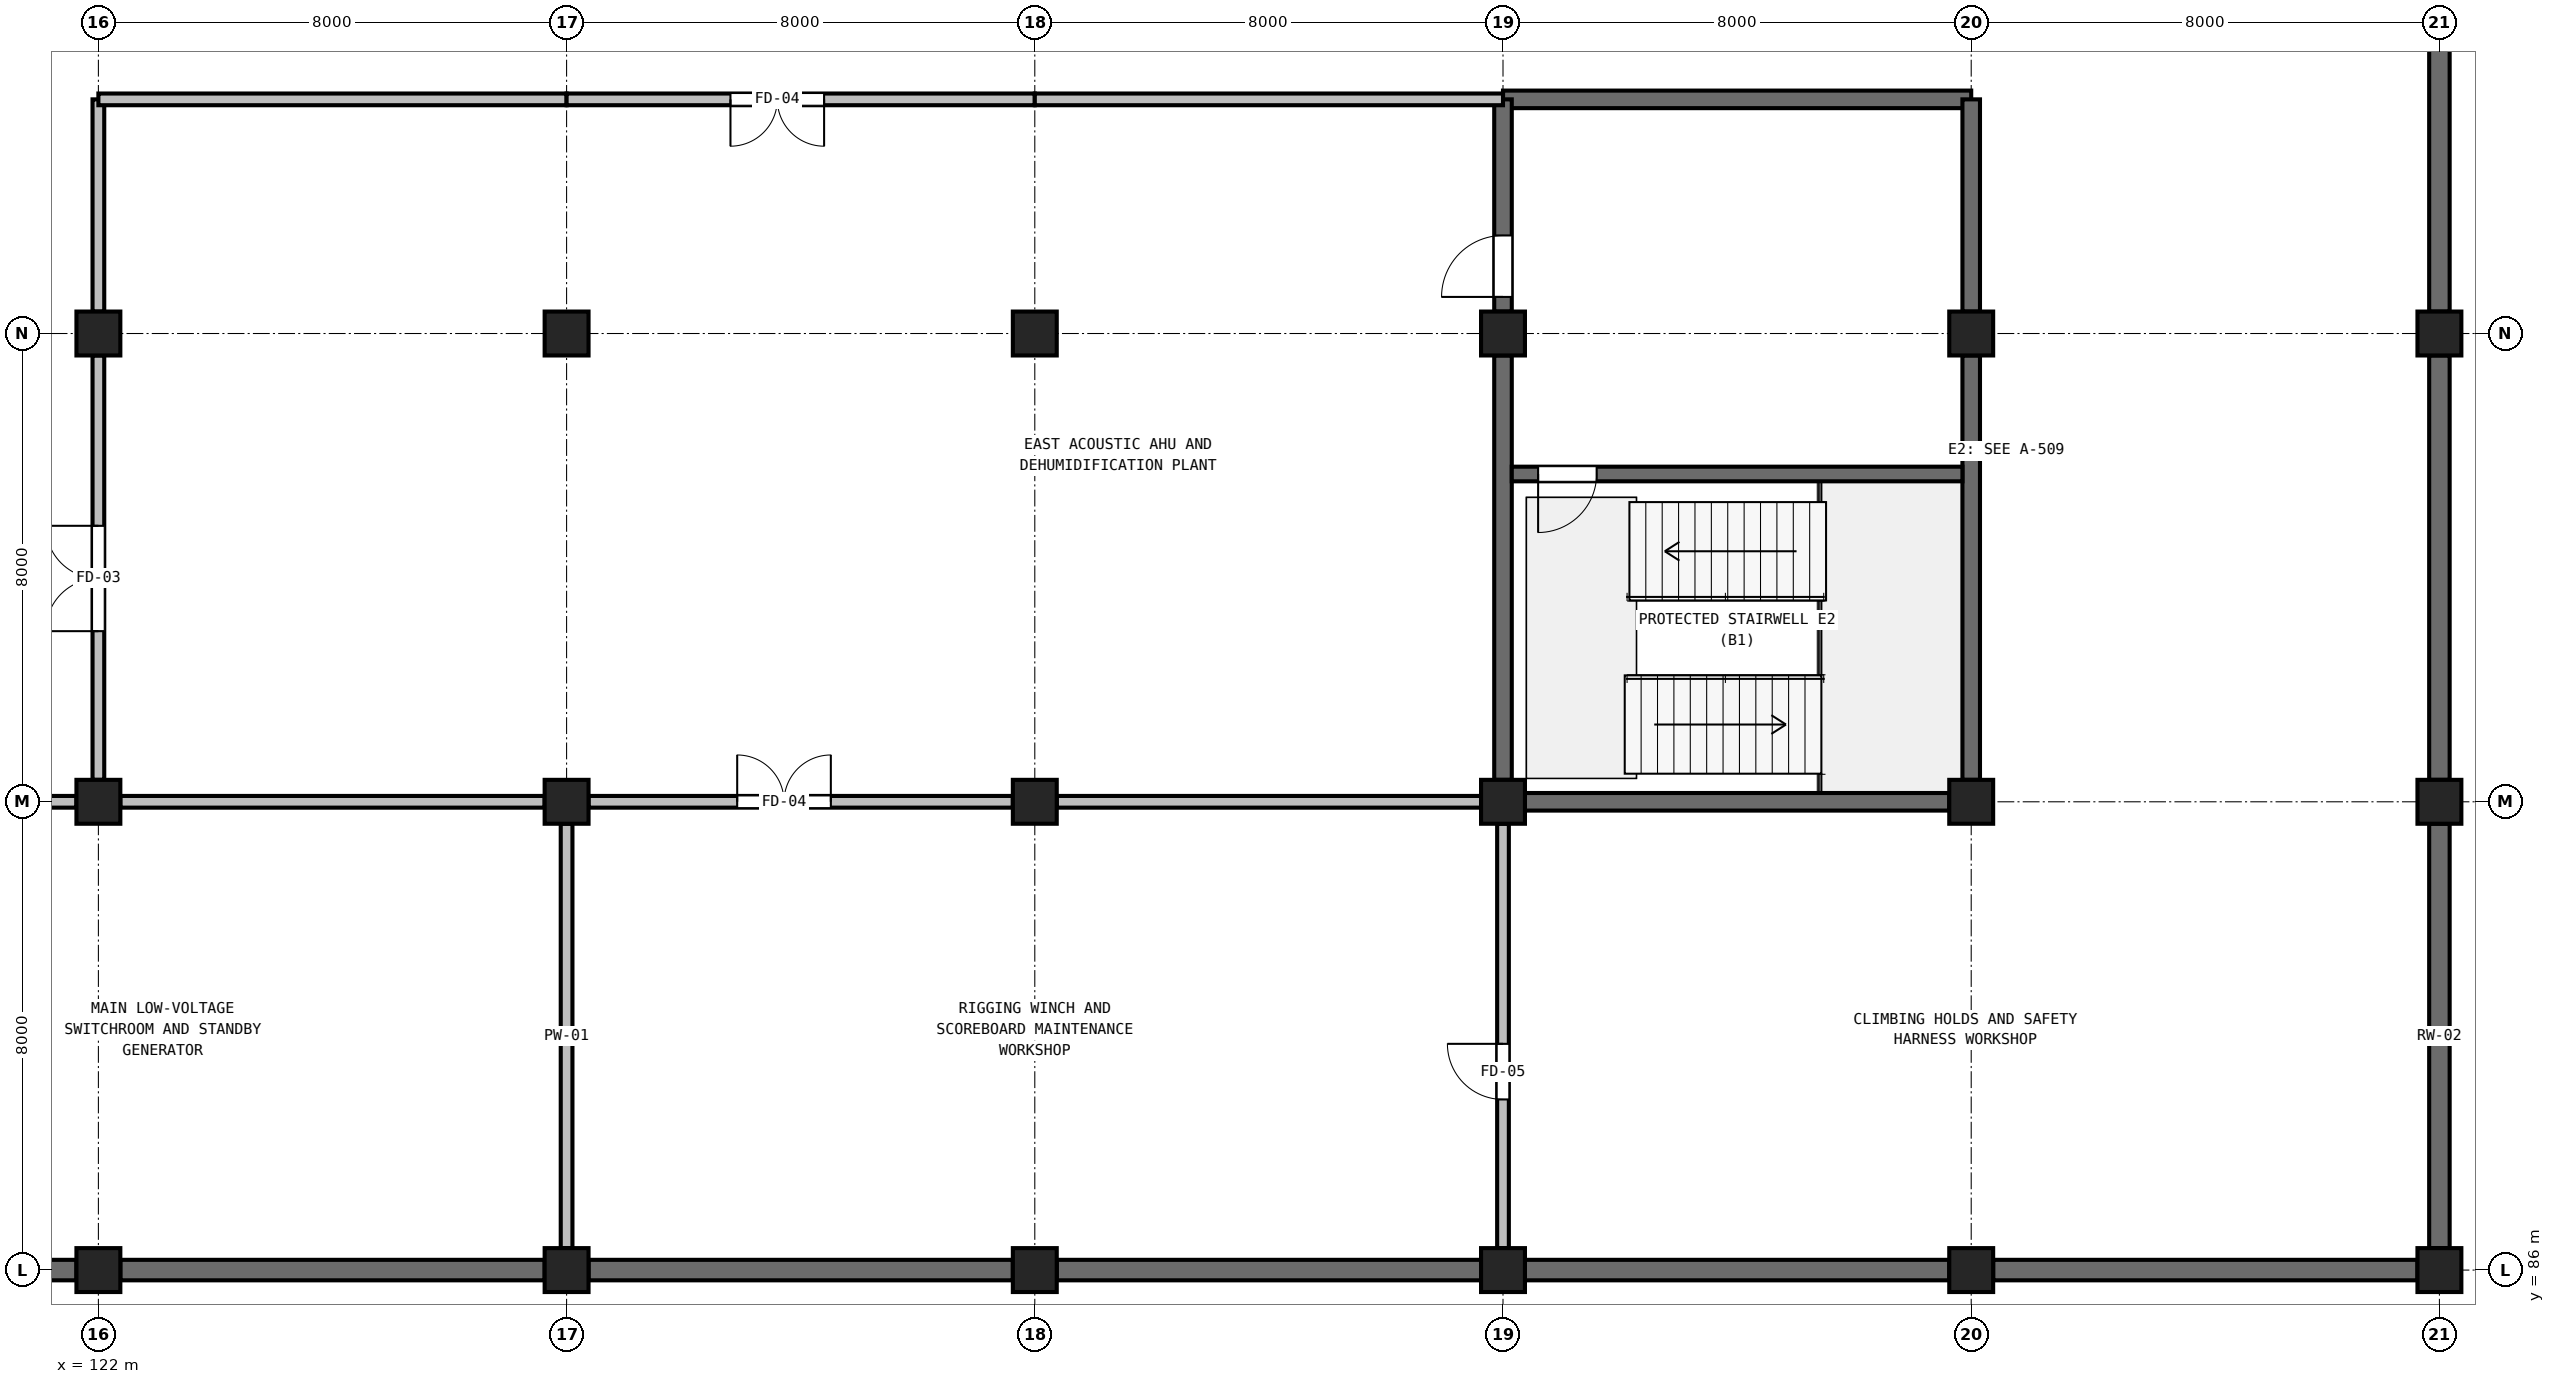
"""IFC4 building model, lengths in metres.
Left out: names, types, materials, properties, quantities, classifications, styles, units other than length and angle.
Written with IfcOpenShell. Run it as: python <this file> out.ifc"""

import sys

from ifc_helpers import new_model, si_unit, direction, frame, frame_2d, origin, origin_2d, place, context, subcontext, project, spatial, rectangle, extrude, element, fill, save


model = new_model("IFC4")
c1 = context("Model", 3, precision=1e-05, world=origin(), true_north=direction((0.0, 1.0)))
c2 = subcontext(c1, "Body", "Model", "MODEL_VIEW")
j1 = project(units=[si_unit("LENGTHUNIT", "METRE"), si_unit("PLANEANGLEUNIT", "RADIAN")], contexts=[c1])
p1 = place(None, origin())
s1 = spatial("IfcSite", under=j1, at=p1, CompositionType="ELEMENT")
p2 = place(p1, origin())
s2 = spatial("IfcBuilding", under=s1, at=p2, CompositionType="ELEMENT")
p3 = place(p2, frame((0.0, 0.0, -4.2)))
s3 = spatial("IfcBuildingStorey", under=s2, at=p3, CompositionType="ELEMENT", Elevation=-4.2)
for number, where, z_axis, x_axis in (
    (1, (122.0, 86.0, 0.0), (0.0, 0.0, 1.0), (1.0, 0.0, 0.0)),
    (2, (122.0, 94.0, 0.0), (0.0, 0.0, 1.0), (1.0, 0.0, 0.0)),
    (3, (122.0, 102.0, 0.0), (0.0, 0.0, 1.0), (1.0, 0.0, 0.0)),
    (4, (130.0, 86.0, 0.0), (0.0, 0.0, 1.0), (1.0, 0.0, 0.0)),
    (5, (130.0, 94.0, 0.0), (0.0, 0.0, 1.0), (1.0, 0.0, 0.0)),
    (6, (130.0, 102.0, 0.0), (0.0, 0.0, 1.0), (1.0, 0.0, 0.0)),
    (7, (138.0, 86.0, 0.0), (0.0, 0.0, 1.0), (1.0, 0.0, 0.0)),
    (8, (138.0, 94.0, 0.0), (0.0, 0.0, 1.0), (1.0, 0.0, 0.0)),
    (9, (138.0, 102.0, 0.0), (0.0, 0.0, 1.0), (1.0, 0.0, 0.0)),
    (10, (146.0, 86.0, 0.0), (0.0, 0.0, 1.0), (1.0, 0.0, 0.0)),
    (11, (146.0, 94.0, 0.0), (0.0, 0.0, 1.0), (1.0, 0.0, 0.0)),
    (12, (146.0, 102.0, 0.0), (0.0, 0.0, 1.0), (1.0, 0.0, 0.0)),
    (13, (154.0, 86.0, 0.0), (0.0, 0.0, 1.0), (1.0, 0.0, 0.0)),
    (14, (154.0, 94.0, 0.0), (0.0, 0.0, 1.0), (1.0, 0.0, 0.0)),
    (15, (154.0, 102.0, 0.0), (0.0, 0.0, 1.0), (1.0, 0.0, 0.0)),
    (16, (162.0, 86.0, 0.0), (0.0, 0.0, 1.0), (1.0, 0.0, 0.0)),
    (17, (162.0, 94.0, 0.0), (0.0, 0.0, 1.0), (1.0, 0.0, 0.0)),
    (18, (162.0, 102.0, 0.0), (0.0, 0.0, 1.0), (1.0, 0.0, 0.0)),
):
    element("IfcColumn", number, at=place(p3, frame(where, z_axis=z_axis, x_axis=x_axis)), inside=s3, PredefinedType="COLUMN", context=c2, shape_type="SweptSolid", body=[
        extrude(rectangle(XDim=0.75, YDim=0.75, at=origin_2d()), origin(), (0.0, 0.0, 1.0), 4.2),
    ])
for number, where, z_axis, x_axis in (
    (19, (114.375, 86.0, 0.0), (0.0, 0.0, 1.0), (1.0, 0.0, 0.0)),
    (20, (122.375, 86.0, 0.0), (0.0, 0.0, 1.0), (1.0, 0.0, 0.0)),
    (21, (130.375, 86.0, 0.0), (0.0, 0.0, 1.0), (1.0, 0.0, 0.0)),
    (22, (138.375, 86.0, 0.0), (0.0, 0.0, 1.0), (1.0, 0.0, 0.0)),
    (23, (146.375, 86.0, 0.0), (0.0, 0.0, 1.0), (1.0, 0.0, 0.0)),
    (24, (154.375, 86.0, 0.0), (0.0, 0.0, 1.0), (1.0, 0.0, 0.0)),
    (25, (162.0, 86.375, 0.0), (0.0, 0.0, 1.0), (0.0, 1.0, 0.0)),
    (26, (162.0, 94.375, 0.0), (0.0, 0.0, 1.0), (0.0, 1.0, 0.0)),
    (27, (162.0, 102.375, 0.0), (0.0, 0.0, 1.0), (0.0, 1.0, 0.0)),
):
    element("IfcWall", number, at=place(p3, frame(where, z_axis=z_axis, x_axis=x_axis)), inside=s3, PredefinedType="USERDEFINED", context=c2, shape_type="SweptSolid", body=[
        extrude(rectangle(XDim=7.25, YDim=0.35, at=frame_2d((3.625, 0.0))), origin(), (0.0, 0.0, 1.0), 3.92),
    ])
p4 = place(p3, frame((146.375, 94.0, 0.0), z_axis=(0.0, 0.0, 1.0), x_axis=(1.0, 0.0, 0.0)))
e28 = element("IfcWall", 28, at=p4, inside=s3, PredefinedType="SHEAR", context=c2, shape_type="SweptSolid", body=[
    extrude(rectangle(XDim=7.25, YDim=0.3, at=frame_2d((3.625, 0.0))), origin(), (0.0, 0.0, 1.0), 3.98),
])
p5 = place(p3, frame((146.0, 106.0, 0.0), z_axis=(0.0, 0.0, 1.0), x_axis=(1.0, 0.0, 0.0)))
e29 = element("IfcWall", 29, at=p5, inside=s3, PredefinedType="SHEAR", context=c2, shape_type="SweptSolid", body=[
    extrude(rectangle(XDim=8.0, YDim=0.3, at=frame_2d((4.0, 0.0))), origin(), (0.0, 0.0, 1.0), 3.98),
])
p6 = place(p3, frame((146.0, 94.375, 0.0), z_axis=(0.0, 0.0, 1.0), x_axis=(0.0, 1.0, 0.0)))
e30 = element("IfcWall", 30, at=p6, inside=s3, PredefinedType="SHEAR", context=c2, shape_type="SweptSolid", body=[
    extrude(rectangle(XDim=7.25, YDim=0.3, at=frame_2d((3.625, 0.0))), origin(), (0.0, 0.0, 1.0), 3.98),
])
p7 = place(p3, frame((146.0, 102.375, 0.0), z_axis=(0.0, 0.0, 1.0), x_axis=(0.0, 1.0, 0.0)))
e31 = element("IfcWall", 31, at=p7, inside=s3, PredefinedType="SHEAR", context=c2, shape_type="SweptSolid", body=[
    extrude(rectangle(XDim=3.625, YDim=0.3, at=frame_2d((1.812, 0.0))), origin(), (0.0, 0.0, 1.0), 3.98),
])
p8 = place(p7, frame((0.25, 0.0, 0.0)))
e32 = element("IfcOpeningElement", 32, at=p8, cuts=e31, PredefinedType="OPENING", context=c2, shape_type="SweptSolid", body=[
    extrude(rectangle(XDim=1.05, YDim=2.2, at=frame_2d((0.525, 1.1))), frame((0.0, 0.16, 0.0), z_axis=(0.0, -1.0, 0.0), x_axis=(1.0, 0.0, 0.0)), (0.0, 0.0, 1.0), 0.32),
])
p9 = place(p3, frame((154.0, 94.375, 0.0), z_axis=(0.0, 0.0, 1.0), x_axis=(0.0, 1.0, 0.0)))
e33 = element("IfcWall", 33, at=p9, inside=s3, PredefinedType="SHEAR", context=c2, shape_type="SweptSolid", body=[
    extrude(rectangle(XDim=7.25, YDim=0.3, at=frame_2d((3.625, 0.0))), origin(), (0.0, 0.0, 1.0), 3.98),
])
p10 = place(p3, frame((154.0, 102.375, 0.0), z_axis=(0.0, 0.0, 1.0), x_axis=(0.0, 1.0, 0.0)))
e34 = element("IfcWall", 34, at=p10, inside=s3, PredefinedType="SHEAR", context=c2, shape_type="SweptSolid", body=[
    extrude(rectangle(XDim=3.625, YDim=0.3, at=frame_2d((1.812, 0.0))), origin(), (0.0, 0.0, 1.0), 3.98),
])
p11 = place(p3, frame((146.15, 99.6, 0.0), z_axis=(0.0, 0.0, 1.0), x_axis=(1.0, 0.0, 0.0)))
e35 = element("IfcWall", 35, at=p11, inside=s3, PredefinedType="SOLIDWALL", context=c2, shape_type="SweptSolid", body=[
    extrude(rectangle(XDim=7.7, YDim=0.25, at=frame_2d((3.85, 0.0))), origin(), (0.0, 0.0, 1.0), 3.98),
])
p12 = place(p11, frame((0.45, 0.0, 0.0)))
e36 = element("IfcOpeningElement", 36, at=p12, cuts=e35, PredefinedType="OPENING", context=c2, shape_type="SweptSolid", body=[
    extrude(rectangle(XDim=1.0, YDim=2.2, at=frame_2d((0.5, 1.1))), frame((0.0, 0.135, 0.0), z_axis=(0.0, -1.0, 0.0), x_axis=(1.0, 0.0, 0.0)), (0.0, 0.0, 1.0), 0.27),
])
p13 = place(p3, frame((114.375, 94.0, 0.0), z_axis=(0.0, 0.0, 1.0), x_axis=(1.0, 0.0, 0.0)))
e37 = element("IfcWall", 37, at=p13, inside=s3, PredefinedType="PARTITIONING", context=c2, shape_type="SweptSolid", body=[
    extrude(rectangle(XDim=7.25, YDim=0.2, at=frame_2d((3.625, 0.0))), origin(), (0.0, 0.0, 1.0), 3.12),
])
p14 = place(p13, frame((2.54, 0.0, 0.0)))
e38 = element("IfcOpeningElement", 38, at=p14, cuts=e37, PredefinedType="OPENING", context=c2, shape_type="SweptSolid", body=[
    extrude(rectangle(XDim=1.8, YDim=2.2, at=frame_2d((0.9, 1.1))), frame((0.0, 0.11, 0.0), z_axis=(0.0, -1.0, 0.0), x_axis=(1.0, 0.0, 0.0)), (0.0, 0.0, 1.0), 0.22),
])
p15 = place(p3, frame((122.375, 94.0, 0.0), z_axis=(0.0, 0.0, 1.0), x_axis=(1.0, 0.0, 0.0)))
e39 = element("IfcWall", 39, at=p15, inside=s3, PredefinedType="PARTITIONING", context=c2, shape_type="SweptSolid", body=[
    extrude(rectangle(XDim=7.25, YDim=0.2, at=frame_2d((3.625, 0.0))), origin(), (0.0, 0.0, 1.0), 3.2),
])
p16 = place(p3, frame((130.375, 94.0, 0.0), z_axis=(0.0, 0.0, 1.0), x_axis=(1.0, 0.0, 0.0)))
e40 = element("IfcWall", 40, at=p16, inside=s3, PredefinedType="PARTITIONING", context=c2, shape_type="SweptSolid", body=[
    extrude(rectangle(XDim=7.25, YDim=0.2, at=frame_2d((3.625, 0.0))), origin(), (0.0, 0.0, 1.0), 3.14),
])
p17 = place(p16, frame((2.54, 0.0, 0.0)))
e41 = element("IfcOpeningElement", 41, at=p17, cuts=e40, PredefinedType="OPENING", context=c2, shape_type="SweptSolid", body=[
    extrude(rectangle(XDim=1.6, YDim=2.2, at=frame_2d((0.8, 1.1))), frame((0.0, 0.11, 0.0), z_axis=(0.0, -1.0, 0.0), x_axis=(1.0, 0.0, 0.0)), (0.0, 0.0, 1.0), 0.22),
])
p18 = place(p3, frame((138.375, 94.0, 0.0), z_axis=(0.0, 0.0, 1.0), x_axis=(1.0, 0.0, 0.0)))
e42 = element("IfcWall", 42, at=p18, inside=s3, PredefinedType="PARTITIONING", context=c2, shape_type="SweptSolid", body=[
    extrude(rectangle(XDim=7.25, YDim=0.2, at=frame_2d((3.625, 0.0))), origin(), (0.0, 0.0, 1.0), 3.37),
])
p19 = place(p3, frame((130.0, 86.375, 0.0), z_axis=(0.0, 0.0, 1.0), x_axis=(0.0, 1.0, 0.0)))
e43 = element("IfcWall", 43, at=p19, inside=s3, PredefinedType="PARTITIONING", context=c2, shape_type="SweptSolid", body=[
    extrude(rectangle(XDim=7.25, YDim=0.2, at=frame_2d((3.625, 0.0))), origin(), (0.0, 0.0, 1.0), 3.17),
])
p20 = place(p3, frame((146.0, 86.375, 0.0), z_axis=(0.0, 0.0, 1.0), x_axis=(0.0, 1.0, 0.0)))
e44 = element("IfcWall", 44, at=p20, inside=s3, PredefinedType="PARTITIONING", context=c2, shape_type="SweptSolid", body=[
    extrude(rectangle(XDim=7.25, YDim=0.2, at=frame_2d((3.625, 0.0))), origin(), (0.0, 0.0, 1.0), 3.02),
])
p21 = place(p20, frame((2.54, 0.0, 0.0)))
e45 = element("IfcOpeningElement", 45, at=p21, cuts=e44, PredefinedType="OPENING", context=c2, shape_type="SweptSolid", body=[
    extrude(rectangle(XDim=0.95, YDim=2.15, at=frame_2d((0.475, 1.075))), frame((0.0, 0.11, 0.0), z_axis=(0.0, -1.0, 0.0), x_axis=(1.0, 0.0, 0.0)), (0.0, 0.0, 1.0), 0.22),
])
p22 = place(p3, frame((122.0, 94.375, 0.0), z_axis=(0.0, 0.0, 1.0), x_axis=(0.0, 1.0, 0.0)))
e46 = element("IfcWall", 46, at=p22, inside=s3, PredefinedType="PARTITIONING", context=c2, shape_type="SweptSolid", body=[
    extrude(rectangle(XDim=7.25, YDim=0.2, at=frame_2d((3.625, 0.0))), origin(), (0.0, 0.0, 1.0), 2.82),
])
p23 = place(p22, frame((2.54, 0.0, 0.0)))
e47 = element("IfcOpeningElement", 47, at=p23, cuts=e46, PredefinedType="OPENING", context=c2, shape_type="SweptSolid", body=[
    extrude(rectangle(XDim=1.8, YDim=2.2, at=frame_2d((0.9, 1.1))), frame((0.0, 0.11, 0.0), z_axis=(0.0, -1.0, 0.0), x_axis=(1.0, 0.0, 0.0)), (0.0, 0.0, 1.0), 0.22),
])
p24 = place(p3, frame((122.0, 102.375, 0.0), z_axis=(0.0, 0.0, 1.0), x_axis=(0.0, 1.0, 0.0)))
e48 = element("IfcWall", 48, at=p24, inside=s3, PredefinedType="PARTITIONING", context=c2, shape_type="SweptSolid", body=[
    extrude(rectangle(XDim=3.625, YDim=0.2, at=frame_2d((1.812, 0.0))), origin(), (0.0, 0.0, 1.0), 3.32),
])
p25 = place(p3, frame((122.0, 106.0, 0.0), z_axis=(0.0, 0.0, 1.0), x_axis=(1.0, 0.0, 0.0)))
e49 = element("IfcWall", 49, at=p25, inside=s3, PredefinedType="PARTITIONING", context=c2, shape_type="SweptSolid", body=[
    extrude(rectangle(XDim=8.0, YDim=0.2, at=frame_2d((4.0, 0.0))), origin(), (0.0, 0.0, 1.0), 3.9),
])
p26 = place(p3, frame((130.0, 106.0, 0.0), z_axis=(0.0, 0.0, 1.0), x_axis=(1.0, 0.0, 0.0)))
e50 = element("IfcWall", 50, at=p26, inside=s3, PredefinedType="PARTITIONING", context=c2, shape_type="SweptSolid", body=[
    extrude(rectangle(XDim=8.0, YDim=0.2, at=frame_2d((4.0, 0.0))), origin(), (0.0, 0.0, 1.0), 3.9),
])
p27 = place(p26, frame((2.8, 0.0, 0.0)))
e51 = element("IfcOpeningElement", 51, at=p27, cuts=e50, PredefinedType="OPENING", context=c2, shape_type="SweptSolid", body=[
    extrude(rectangle(XDim=1.6, YDim=2.2, at=frame_2d((0.8, 1.1))), frame((0.0, 0.11, 0.0), z_axis=(0.0, -1.0, 0.0), x_axis=(1.0, 0.0, 0.0)), (0.0, 0.0, 1.0), 0.22),
])
p28 = place(p3, frame((138.0, 106.0, 0.0), z_axis=(0.0, 0.0, 1.0), x_axis=(1.0, 0.0, 0.0)))
e52 = element("IfcWall", 52, at=p28, inside=s3, PredefinedType="PARTITIONING", context=c2, shape_type="SweptSolid", body=[
    extrude(rectangle(XDim=8.0, YDim=0.2, at=frame_2d((4.0, 0.0))), origin(), (0.0, 0.0, 1.0), 3.9),
])
p29 = place(p8, origin())
e53 = element("IfcDoor", 53, at=p29, inside=s3, OperationType="SINGLE_SWING_LEFT", PredefinedType="DOOR", context=c2, shape_type="SweptSolid", body=[
    extrude(rectangle(XDim=1.05, YDim=2.2, at=frame_2d((0.525, 1.1))), frame((0.0, 0.025, 0.0), z_axis=(0.0, -1.0, 0.0), x_axis=(1.0, 0.0, 0.0)), (0.0, 0.0, 1.0), 0.05),
])
fill(e32, e53)
p30 = place(p12, frame((1.0, 0.0, 0.0), z_axis=(0.0, 0.0, 1.0), x_axis=(-1.0, 0.0, 0.0)))
e54 = element("IfcDoor", 54, at=p30, inside=s3, OperationType="SINGLE_SWING_LEFT", PredefinedType="DOOR", context=c2, shape_type="SweptSolid", body=[
    extrude(rectangle(XDim=1.0, YDim=2.2, at=frame_2d((0.5, 1.1))), frame((0.0, 0.025, 0.0), z_axis=(0.0, -1.0, 0.0), x_axis=(1.0, 0.0, 0.0)), (0.0, 0.0, 1.0), 0.05),
])
fill(e36, e54)
p31 = place(p17, origin())
e55 = element("IfcDoor", 55, at=p31, inside=s3, OperationType="DOUBLE_DOOR_SINGLE_SWING", PredefinedType="DOOR", context=c2, shape_type="SweptSolid", body=[
    extrude(rectangle(XDim=1.6, YDim=2.2, at=frame_2d((0.8, 1.1))), frame((0.0, 0.025, 0.0), z_axis=(0.0, -1.0, 0.0), x_axis=(1.0, 0.0, 0.0)), (0.0, 0.0, 1.0), 0.05),
])
fill(e41, e55)
p32 = place(p21, origin())
e56 = element("IfcDoor", 56, at=p32, inside=s3, OperationType="SINGLE_SWING_RIGHT", PredefinedType="DOOR", context=c2, shape_type="SweptSolid", body=[
    extrude(rectangle(XDim=0.95, YDim=2.15, at=frame_2d((0.475, 1.075))), frame((0.0, 0.025, 0.0), z_axis=(0.0, -1.0, 0.0), x_axis=(1.0, 0.0, 0.0)), (0.0, 0.0, 1.0), 0.05),
])
fill(e45, e56)
p33 = place(p23, origin())
e57 = element("IfcDoor", 57, at=p33, inside=s3, OperationType="DOUBLE_DOOR_SINGLE_SWING", PredefinedType="DOOR", context=c2, shape_type="SweptSolid", body=[
    extrude(rectangle(XDim=1.8, YDim=2.2, at=frame_2d((0.9, 1.1))), frame((0.0, 0.025, 0.0), z_axis=(0.0, -1.0, 0.0), x_axis=(1.0, 0.0, 0.0)), (0.0, 0.0, 1.0), 0.05),
])
fill(e47, e57)
p34 = place(p27, frame((1.6, 0.0, 0.0), z_axis=(0.0, 0.0, 1.0), x_axis=(-1.0, 0.0, 0.0)))
e58 = element("IfcDoor", 58, at=p34, inside=s3, OperationType="DOUBLE_DOOR_SINGLE_SWING", PredefinedType="DOOR", context=c2, shape_type="SweptSolid", body=[
    extrude(rectangle(XDim=1.6, YDim=2.2, at=frame_2d((0.8, 1.1))), frame((0.0, 0.025, 0.0), z_axis=(0.0, -1.0, 0.0), x_axis=(1.0, 0.0, 0.0)), (0.0, 0.0, 1.0), 0.05),
])
fill(e51, e58)
save(model, sys.argv[1])
